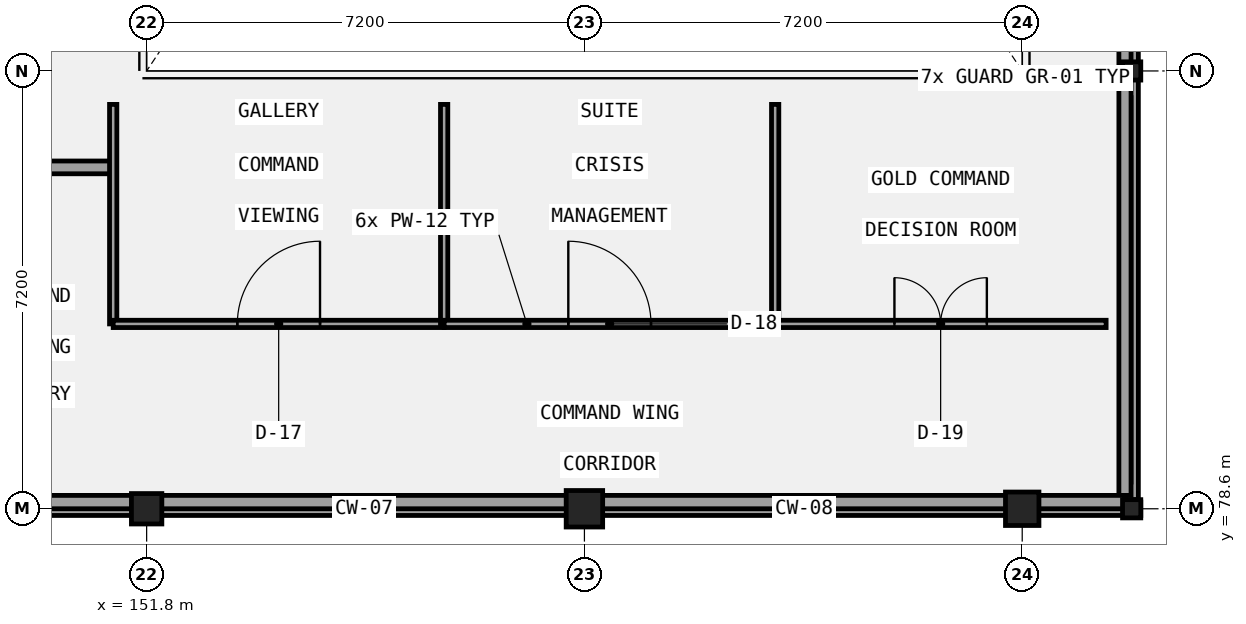
"""IFC4 building model, lengths in metres.
Left out: names, types, materials, properties, quantities, classifications, styles, units other than length and angle.
Written with IfcOpenShell. Run it as: python <this file> out.ifc"""

import sys

from ifc_helpers import new_model, si_unit, direction, frame, frame_2d, origin, origin_2d, place, context, subcontext, project, spatial, rectangle, i_section, extrude, element, fill, save


model = new_model("IFC4")
c1 = context("Model", 3, precision=1e-05, world=origin(), true_north=direction((0.0, 1.0)))
c2 = subcontext(c1, "Body", "Model", "MODEL_VIEW")
j1 = project(units=[si_unit("LENGTHUNIT", "METRE"), si_unit("PLANEANGLEUNIT", "RADIAN")], contexts=[c1])
p1 = place(None, origin())
s1 = spatial("IfcSite", under=j1, at=p1, CompositionType="ELEMENT")
p2 = place(p1, origin())
s2 = spatial("IfcBuilding", under=s1, at=p2, CompositionType="ELEMENT")
p3 = place(p2, frame((0.0, 0.0, 30.9)))
s3 = spatial("IfcBuildingStorey", under=s2, at=p3, CompositionType="ELEMENT", Elevation=30.9)
p4 = place(p3, frame((151.8, 78.6, 0.0), z_axis=(0.0, 0.0, 1.0), x_axis=(1.0, 0.0, 0.0)))
e1 = element("IfcColumn", 1, at=p4, inside=s3, PredefinedType="COLUMN", context=c2, shape_type="SweptSolid", body=[
    extrude(rectangle(XDim=0.5, YDim=0.5, at=origin_2d()), origin(), (0.0, 0.0, 1.0), 4.5),
])
p5 = place(p3, frame((159.0, 78.6, 0.0), z_axis=(0.0, 0.0, 1.0), x_axis=(1.0, 0.0, 0.0)))
e2 = element("IfcColumn", 2, at=p5, inside=s3, PredefinedType="COLUMN", context=c2, shape_type="SweptSolid", body=[
    extrude(rectangle(XDim=0.6, YDim=0.6, at=origin_2d()), origin(), (0.0, 0.0, 1.0), 4.5),
])
p6 = place(p3, frame((166.2, 78.6, 0.0), z_axis=(0.0, 0.0, 1.0), x_axis=(1.0, 0.0, 0.0)))
e3 = element("IfcColumn", 3, at=p6, inside=s3, PredefinedType="COLUMN", context=c2, shape_type="SweptSolid", body=[
    extrude(rectangle(XDim=0.55, YDim=0.55, at=origin_2d()), origin(), (0.0, 0.0, 1.0), 4.5),
])
for number, where, z_axis, x_axis in (
    (4, (168.0, 78.6, 0.0), (0.0, 0.0, 1.0), (1.0, 0.0, 0.0)),
    (5, (168.0, 85.8, 0.0), (0.0, 0.0, 1.0), (1.0, 0.0, 0.0)),
):
    element("IfcColumn", number, at=place(p3, frame(where, z_axis=z_axis, x_axis=x_axis)), inside=s3, PredefinedType="COLUMN", context=c2, shape_type="SweptSolid", body=[
        extrude(i_section(OverallWidth=0.3, OverallDepth=0.3, WebThickness=0.011, FlangeThickness=0.019, FilletRadius=0.027, at=origin_2d()), origin(), (0.0, 0.0, 1.0), 4.5),
    ])
p7 = place(p3, frame((144.45, 78.6, 0.0), z_axis=(0.0, 0.0, 1.0), x_axis=(1.0, 0.0, 0.0)))
e6 = element("IfcWall", 6, at=p7, inside=s3, PredefinedType="PARAPET", context=c2, shape_type="SweptSolid", body=[
    extrude(rectangle(XDim=23.7, YDim=0.22, at=frame_2d((11.85, 0.0))), origin(), (0.0, 0.0, 1.0), 0.45),
])
p8 = place(p3, frame((168.0, 78.75, 0.0), z_axis=(0.0, 0.0, 1.0), x_axis=(0.0, 1.0, 0.0)))
e7 = element("IfcWall", 7, at=p8, inside=s3, PredefinedType="PARAPET", context=c2, shape_type="SweptSolid", body=[
    extrude(rectangle(XDim=36.9, YDim=0.22, at=frame_2d((18.45, 0.0))), origin(), (0.0, 0.0, 1.0), 0.45),
])
p9 = place(p3, frame((167.89, 115.58, 4.5), z_axis=(0.0, 0.0, 1.0), x_axis=(0.0, -1.0, 0.0)))
e8 = element("IfcWall", 8, at=p9, inside=s3, PredefinedType="PARAPET", context=c2, shape_type="SweptSolid", body=[
    extrude(rectangle(XDim=36.76, YDim=0.2, at=frame_2d((18.38, 0.0))), origin(), (0.0, 0.0, 1.0), 1.12),
])
p10 = place(p3, frame((167.89, 78.71, 4.5), z_axis=(0.0, 0.0, 1.0), x_axis=(-1.0, 0.0, 0.0)))
e9 = element("IfcWall", 9, at=p10, inside=s3, PredefinedType="PARAPET", context=c2, shape_type="SweptSolid", body=[
    extrude(rectangle(XDim=59.18, YDim=0.22, at=frame_2d((29.59, 0.0))), origin(), (0.0, 0.0, 1.0), 1.12),
])
p11 = place(p3, frame((147.87, 84.214, 0.0), z_axis=(0.0, 0.0, 1.0), x_axis=(1.0, 0.0, 0.0)))
e10 = element("IfcWall", 10, at=p11, inside=s3, PredefinedType="PARTITIONING", context=c2, shape_type="SweptSolid", body=[
    extrude(rectangle(XDim=3.38, YDim=0.21, at=frame_2d((1.69, 0.0))), origin(), (0.0, 0.0, 1.0), 4.25),
])
p12 = place(p3, frame((151.25, 81.64, 0.0), z_axis=(0.0, 0.0, 1.0), x_axis=(0.0, 1.0, 0.0)))
e11 = element("IfcWall", 11, at=p12, inside=s3, PredefinedType="PARTITIONING", context=c2, shape_type="SweptSolid", body=[
    extrude(rectangle(XDim=3.61, YDim=0.12, at=frame_2d((1.805, 0.0))), origin(), (0.0, 0.0, 1.0), 4.25),
])
p13 = place(p3, frame((151.25, 81.64, 0.0), z_axis=(0.0, 0.0, 1.0), x_axis=(1.0, 0.0, 0.0)))
e12 = element("IfcWall", 12, at=p13, inside=s3, PredefinedType="PARTITIONING", context=c2, shape_type="SweptSolid", body=[
    extrude(rectangle(XDim=5.443, YDim=0.12, at=frame_2d((2.722, 0.0))), origin(), (0.0, 0.0, 1.0), 4.25),
])
p14 = place(p13, frame((2.042, 0.0, 0.0)))
e13 = element("IfcOpeningElement", 13, at=p14, cuts=e12, PredefinedType="OPENING", context=c2, shape_type="SweptSolid", body=[
    extrude(rectangle(XDim=1.36, YDim=2.22, at=frame_2d((0.68, 1.11))), frame((0.0, 0.07, 0.0), z_axis=(0.0, -1.0, 0.0), x_axis=(1.0, 0.0, 0.0)), (0.0, 0.0, 1.0), 0.14),
])
p15 = place(p3, frame((156.693, 81.64, 0.0), z_axis=(0.0, 0.0, 1.0), x_axis=(0.0, 1.0, 0.0)))
e14 = element("IfcWall", 14, at=p15, inside=s3, PredefinedType="PARTITIONING", context=c2, shape_type="SweptSolid", body=[
    extrude(rectangle(XDim=3.61, YDim=0.12, at=frame_2d((1.805, 0.0))), origin(), (0.0, 0.0, 1.0), 4.25),
])
p16 = place(p3, frame((156.693, 81.64, 0.0), z_axis=(0.0, 0.0, 1.0), x_axis=(1.0, 0.0, 0.0)))
e15 = element("IfcWall", 15, at=p16, inside=s3, PredefinedType="PARTITIONING", context=c2, shape_type="SweptSolid", body=[
    extrude(rectangle(XDim=5.444, YDim=0.12, at=frame_2d((2.722, 0.0))), origin(), (0.0, 0.0, 1.0), 4.25),
])
p17 = place(p16, frame((2.042, 0.0, 0.0)))
e16 = element("IfcOpeningElement", 16, at=p17, cuts=e15, PredefinedType="OPENING", context=c2, shape_type="SweptSolid", body=[
    extrude(rectangle(XDim=1.36, YDim=2.35, at=frame_2d((0.68, 1.175))), frame((0.0, 0.07, 0.0), z_axis=(0.0, -1.0, 0.0), x_axis=(1.0, 0.0, 0.0)), (0.0, 0.0, 1.0), 0.14),
])
p18 = place(p3, frame((162.137, 81.64, 0.0), z_axis=(0.0, 0.0, 1.0), x_axis=(0.0, 1.0, 0.0)))
e17 = element("IfcWall", 17, at=p18, inside=s3, PredefinedType="PARTITIONING", context=c2, shape_type="SweptSolid", body=[
    extrude(rectangle(XDim=3.61, YDim=0.12, at=frame_2d((1.805, 0.0))), origin(), (0.0, 0.0, 1.0), 4.25),
])
p19 = place(p3, frame((162.137, 81.64, 0.0), z_axis=(0.0, 0.0, 1.0), x_axis=(1.0, 0.0, 0.0)))
e18 = element("IfcWall", 18, at=p19, inside=s3, PredefinedType="PARTITIONING", context=c2, shape_type="SweptSolid", body=[
    extrude(rectangle(XDim=5.443, YDim=0.12, at=frame_2d((2.722, 0.0))), origin(), (0.0, 0.0, 1.0), 4.25),
])
p20 = place(p19, frame((1.961, 0.0, 0.0)))
e19 = element("IfcOpeningElement", 19, at=p20, cuts=e18, PredefinedType="OPENING", context=c2, shape_type="SweptSolid", body=[
    extrude(rectangle(XDim=1.52, YDim=2.1, at=frame_2d((0.76, 1.05))), frame((0.0, 0.07, 0.0), z_axis=(0.0, -1.0, 0.0), x_axis=(1.0, 0.0, 0.0)), (0.0, 0.0, 1.0), 0.14),
])
p21 = place(p14, origin())
e20 = element("IfcDoor", 20, at=p21, inside=s3, OperationType="SINGLE_SWING_RIGHT", PredefinedType="DOOR", context=c2, shape_type="SweptSolid", body=[
    extrude(rectangle(XDim=1.36, YDim=2.22, at=frame_2d((0.68, 1.11))), frame((0.0, 0.025, 0.0), z_axis=(0.0, -1.0, 0.0), x_axis=(1.0, 0.0, 0.0)), (0.0, 0.0, 1.0), 0.05),
])
fill(e13, e20)
p22 = place(p17, origin())
e21 = element("IfcDoor", 21, at=p22, inside=s3, OperationType="SINGLE_SWING_LEFT", PredefinedType="DOOR", context=c2, shape_type="SweptSolid", body=[
    extrude(rectangle(XDim=1.36, YDim=2.35, at=frame_2d((0.68, 1.175))), frame((0.0, 0.025, 0.0), z_axis=(0.0, -1.0, 0.0), x_axis=(1.0, 0.0, 0.0)), (0.0, 0.0, 1.0), 0.05),
])
fill(e16, e21)
p23 = place(p20, origin())
e22 = element("IfcDoor", 22, at=p23, inside=s3, OperationType="DOUBLE_DOOR_SINGLE_SWING", PredefinedType="DOOR", context=c2, shape_type="SweptSolid", body=[
    extrude(rectangle(XDim=1.52, YDim=2.1, at=frame_2d((0.76, 1.05))), frame((0.0, 0.025, 0.0), z_axis=(0.0, -1.0, 0.0), x_axis=(1.0, 0.0, 0.0)), (0.0, 0.0, 1.0), 0.05),
])
fill(e19, e22)
save(model, sys.argv[1])
